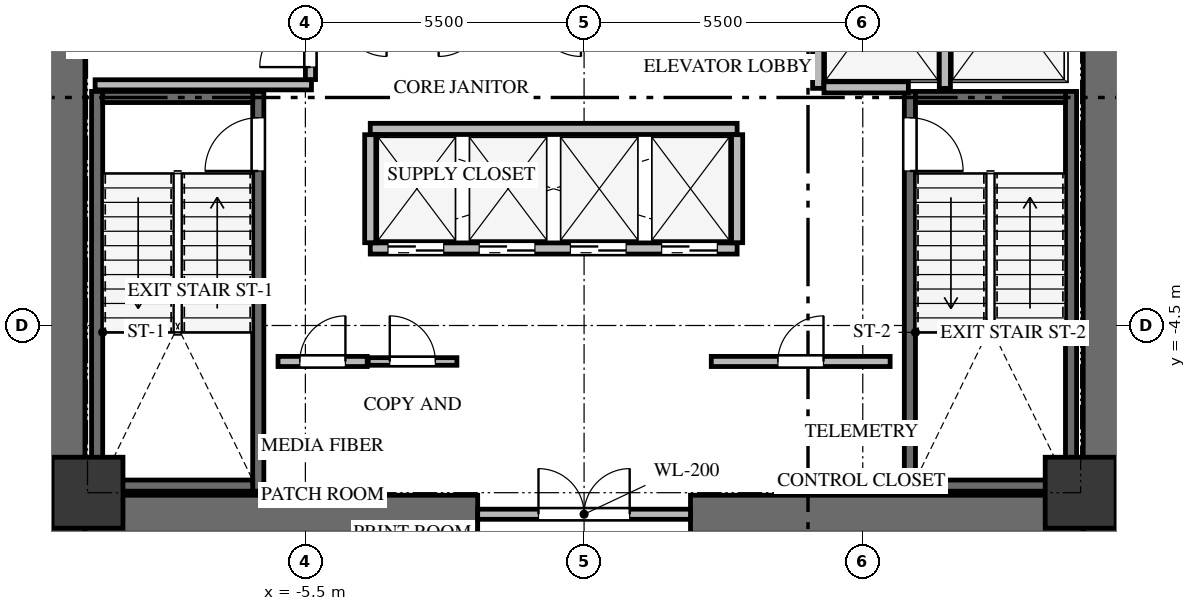
"""IFC4 building model, lengths in metres.
Left out: names, types, materials, properties, quantities, classifications, styles, units other than length and angle.
Written with IfcOpenShell. Run it as: python <this file> out.ifc"""

import sys

from ifc_helpers import new_model, si_unit, direction, frame, frame_2d, origin, origin_2d, place, context, subcontext, project, spatial, rectangle, extrude, source, transform, mapped, element, fill, save


model = new_model("IFC4")
c1 = context("Model", 3, precision=1e-05, world=origin(), true_north=direction((0.0, 1.0)))
c2 = subcontext(c1, "Body", "Model", "MODEL_VIEW")
j1 = project(units=[si_unit("LENGTHUNIT", "METRE"), si_unit("PLANEANGLEUNIT", "RADIAN")], contexts=[c1])
p1 = place(None, origin())
s1 = spatial("IfcSite", under=j1, at=p1, CompositionType="ELEMENT")
p2 = place(p1, origin())
s2 = spatial("IfcBuilding", under=s1, at=p2, CompositionType="ELEMENT")
p3 = place(p2, frame((0.0, 0.0, 93.3)))
s3 = spatial("IfcBuildingStorey", under=s2, at=p3, CompositionType="ELEMENT", Elevation=93.3)
for number, where, z_axis, x_axis in (
    (1, (-10.225, -8.6, 0.0), (0.0, 0.0, 1.0), (0.0, 1.0, 0.0)),
    (2, (10.225, -8.6, 0.0), (0.0, 0.0, 1.0), (0.0, 1.0, 0.0)),
):
    element("IfcWall", number, at=place(p3, frame(where, z_axis=z_axis, x_axis=x_axis)), inside=s3, PredefinedType="SHEAR", context=c2, shape_type="SweptSolid", body=[
        extrude(rectangle(XDim=17.2, YDim=0.75, at=frame_2d((8.6, 0.0))), origin(), (0.0, 0.0, 1.0), 4.2),
    ])
for number, where, z_axis, x_axis in (
    (3, (-9.85, -8.225, 0.0), (0.0, 0.0, 1.0), (1.0, 0.0, 0.0)),
    (4, (2.1, -8.225, 0.0), (0.0, 0.0, 1.0), (1.0, 0.0, 0.0)),
):
    element("IfcWall", number, at=place(p3, frame(where, z_axis=z_axis, x_axis=x_axis)), inside=s3, PredefinedType="SHEAR", context=c2, shape_type="SweptSolid", body=[
        extrude(rectangle(XDim=7.75, YDim=0.75, at=frame_2d((3.875, 0.0))), origin(), (0.0, 0.0, 1.0), 4.2),
    ])
p4 = place(p3, frame((-6.43, -7.77, -0.3), z_axis=(0.0, 0.0, 1.0), x_axis=(0.0, 1.0, 0.0)))
e5 = element("IfcWall", 5, at=p4, inside=s3, PredefinedType="SHEAR", context=c2, shape_type="SweptSolid", body=[
    extrude(rectangle(XDim=7.89, YDim=0.22, at=frame_2d((3.945, 0.0))), origin(), (0.0, 0.0, 1.0), 4.26),
])
p5 = place(p4, frame((6.32, 0.0, 0.0)))
e6 = element("IfcOpeningElement", 6, at=p5, cuts=e5, PredefinedType="OPENING", context=c2, shape_type="SweptSolid", body=[
    extrude(rectangle(XDim=1.05, YDim=2.15, at=frame_2d((0.525, 1.075))), frame((0.0, 0.12, 0.0), z_axis=(0.0, -1.0, 0.0), x_axis=(1.0, 0.0, 0.0)), (0.0, 0.0, 1.0), 0.24),
])
p6 = place(p3, frame((-9.61, 0.12, -0.3), z_axis=(0.0, 0.0, 1.0), x_axis=(0.0, -1.0, 0.0)))
e7 = element("IfcWall", 7, at=p6, inside=s3, PredefinedType="SHEAR", context=c2, shape_type="SweptSolid", body=[
    extrude(rectangle(XDim=7.89, YDim=0.22, at=frame_2d((3.945, 0.0))), origin(), (0.0, 0.0, 1.0), 4.26),
])
for number, where, z_axis, x_axis in (
    (8, (-9.5, -7.66, -0.3), (0.0, 0.0, 1.0), (1.0, 0.0, 0.0)),
    (9, (-6.54, 0.01, -0.3), (0.0, 0.0, 1.0), (-1.0, 0.0, 0.0)),
):
    element("IfcWall", number, at=place(p3, frame(where, z_axis=z_axis, x_axis=x_axis)), inside=s3, PredefinedType="SHEAR", context=c2, shape_type="SweptSolid", body=[
        extrude(rectangle(XDim=2.96, YDim=0.22, at=frame_2d((1.48, 0.0))), origin(), (0.0, 0.0, 1.0), 4.26),
    ])
p7 = place(p3, frame((9.61, -7.77, -0.3), z_axis=(0.0, 0.0, 1.0), x_axis=(0.0, 1.0, 0.0)))
e10 = element("IfcWall", 10, at=p7, inside=s3, PredefinedType="SHEAR", context=c2, shape_type="SweptSolid", body=[
    extrude(rectangle(XDim=7.89, YDim=0.22, at=frame_2d((3.945, 0.0))), origin(), (0.0, 0.0, 1.0), 4.26),
])
p8 = place(p3, frame((6.43, 0.12, -0.3), z_axis=(0.0, 0.0, 1.0), x_axis=(0.0, -1.0, 0.0)))
e11 = element("IfcWall", 11, at=p8, inside=s3, PredefinedType="SHEAR", context=c2, shape_type="SweptSolid", body=[
    extrude(rectangle(XDim=7.89, YDim=0.22, at=frame_2d((3.945, 0.0))), origin(), (0.0, 0.0, 1.0), 4.26),
])
p9 = place(p8, frame((0.52, 0.0, 0.0)))
e12 = element("IfcOpeningElement", 12, at=p9, cuts=e11, PredefinedType="OPENING", context=c2, shape_type="SweptSolid", body=[
    extrude(rectangle(XDim=1.05, YDim=2.15, at=frame_2d((0.525, 1.075))), frame((0.0, 0.12, 0.0), z_axis=(0.0, -1.0, 0.0), x_axis=(1.0, 0.0, 0.0)), (0.0, 0.0, 1.0), 0.24),
])
for number, where, z_axis, x_axis in (
    (13, (6.54, -7.66, -0.3), (0.0, 0.0, 1.0), (1.0, 0.0, 0.0)),
    (14, (9.5, 0.01, -0.3), (0.0, 0.0, 1.0), (-1.0, 0.0, 0.0)),
):
    element("IfcWall", number, at=place(p3, frame(where, z_axis=z_axis, x_axis=x_axis)), inside=s3, PredefinedType="SHEAR", context=c2, shape_type="SweptSolid", body=[
        extrude(rectangle(XDim=2.96, YDim=0.22, at=frame_2d((1.48, 0.0))), origin(), (0.0, 0.0, 1.0), 4.26),
    ])
m1 = source(origin(), c2, "Body", "SweptSolid", [
    extrude(rectangle(XDim=1.4, YDim=1.4, at=origin_2d()), origin(), (0.0, 0.0, 1.0), 4.26),
])
for number, where, z_axis, x_axis in (
    (15, (-9.8, -7.8, -0.3), (0.0, 0.0, 1.0), (1.0, 0.0, 0.0)),
    (16, (9.8, -7.8, -0.3), (0.0, 0.0, 1.0), (1.0, 0.0, 0.0)),
):
    element("IfcColumn", number, at=place(p3, frame(where, z_axis=z_axis, x_axis=x_axis)), inside=s3, PredefinedType="COLUMN", context=c2, shape_type="MappedRepresentation", body=[
        mapped(m1, transform((0.0, 0.0, 0.0), x_axis=(1.0, 0.0, 0.0), y_axis=(0.0, 1.0, 0.0), z_axis=(0.0, 0.0, 1.0), scale=1.0)),
    ])
p10 = place(p3, frame((-2.1, -8.225, 0.0), z_axis=(0.0, 0.0, 1.0), x_axis=(1.0, 0.0, 0.0)))
e17 = element("IfcWall", 17, at=p10, inside=s3, PredefinedType="SOLIDWALL", context=c2, shape_type="SweptSolid", body=[
    extrude(rectangle(XDim=4.2, YDim=0.2, at=frame_2d((2.1, 0.0))), origin(), (0.0, 0.0, 1.0), 3.945),
])
p11 = place(p10, frame((1.2, 0.0, 0.0)))
e18 = element("IfcOpeningElement", 18, at=p11, cuts=e17, PredefinedType="OPENING", context=c2, shape_type="SweptSolid", body=[
    extrude(rectangle(XDim=1.8, YDim=2.15, at=frame_2d((0.9, 1.075))), frame((0.0, 0.11, 0.0), z_axis=(0.0, -1.0, 0.0), x_axis=(1.0, 0.0, 0.0)), (0.0, 0.0, 1.0), 0.22),
])
p12 = place(p3, frame((-9.65, 0.25, 0.0), z_axis=(0.0, 0.0, 1.0), x_axis=(1.0, 0.0, 0.0)))
e19 = element("IfcWall", 19, at=p12, inside=s3, PredefinedType="SOLIDWALL", context=c2, shape_type="SweptSolid", body=[
    extrude(rectangle(XDim=4.27, YDim=0.2, at=frame_2d((2.135, 0.0))), origin(), (0.0, 0.0, 1.0), 3.945),
])
p13 = place(p3, frame((-5.4, 0.354, 0.0), z_axis=(0.0, 0.0, 1.0), x_axis=(0.0, 1.0, 0.0)))
e20 = element("IfcWall", 20, at=p13, inside=s3, PredefinedType="SOLIDWALL", context=c2, shape_type="SweptSolid", body=[
    extrude(rectangle(XDim=4.026, YDim=0.2, at=frame_2d((2.013, 0.0))), origin(), (0.0, 0.0, 1.0), 3.945),
])
p14 = place(p13, frame((0.246, 0.0, 0.0)))
e21 = element("IfcOpeningElement", 21, at=p14, cuts=e20, PredefinedType="OPENING", context=c2, shape_type="SweptSolid", body=[
    extrude(rectangle(XDim=1.0, YDim=2.15, at=frame_2d((0.5, 1.075))), frame((0.0, 0.11, 0.0), z_axis=(0.0, -1.0, 0.0), x_axis=(1.0, 0.0, 0.0)), (0.0, 0.0, 1.0), 0.22),
])
for number, where, z_axis, x_axis in (
    (22, (4.62, 0.18, 0.0), (0.0, 0.0, 1.0), (0.0, 1.0, 0.0)),
    (23, (7.12, 0.18, 0.0), (0.0, 0.0, 1.0), (0.0, 1.0, 0.0)),
):
    element("IfcWall", number, at=place(p3, frame(where, z_axis=z_axis, x_axis=x_axis)), inside=s3, PredefinedType="SOLIDWALL", context=c2, shape_type="SweptSolid", body=[
        extrude(rectangle(XDim=3.186, YDim=0.22, at=frame_2d((1.593, 0.0))), origin(), (0.0, 0.0, 1.0), 3.945),
    ])
p15 = place(p3, frame((4.734, 0.2, 0.0), z_axis=(0.0, 0.0, 1.0), x_axis=(1.0, 0.0, 0.0)))
e24 = element("IfcWall", 24, at=p15, inside=s3, PredefinedType="SOLIDWALL", context=c2, shape_type="SweptSolid", body=[
    extrude(rectangle(XDim=1.666, YDim=0.22, at=frame_2d((0.833, 0.0))), origin(), (0.0, 0.0, 1.0), 3.945),
])
p16 = place(p3, frame((-4.22, -2.98, 0.0), z_axis=(0.0, 0.0, 1.0), x_axis=(1.0, 0.0, 0.0)))
e25 = element("IfcWall", 25, at=p16, inside=s3, PredefinedType="SOLIDWALL", context=c2, shape_type="SweptSolid", body=[
    extrude(rectangle(XDim=7.24, YDim=0.22, at=frame_2d((3.62, 0.0))), origin(), (0.0, 0.0, 1.0), 3.945),
])
p17 = place(p16, frame((0.35, 0.0, 0.0)))
e26 = element("IfcOpeningElement", 26, at=p17, cuts=e25, PredefinedType="OPENING", context=c2, shape_type="SweptSolid", body=[
    extrude(rectangle(XDim=1.1, YDim=2.15, at=frame_2d((0.55, 1.075))), frame((0.0, 0.12, 0.0), z_axis=(0.0, -1.0, 0.0), x_axis=(1.0, 0.0, 0.0)), (0.0, 0.0, 1.0), 0.24),
])
p18 = place(p16, frame((2.15, 0.0, 0.0)))
e27 = element("IfcOpeningElement", 27, at=p18, cuts=e25, PredefinedType="OPENING", context=c2, shape_type="SweptSolid", body=[
    extrude(rectangle(XDim=1.1, YDim=2.15, at=frame_2d((0.55, 1.075))), frame((0.0, 0.12, 0.0), z_axis=(0.0, -1.0, 0.0), x_axis=(1.0, 0.0, 0.0)), (0.0, 0.0, 1.0), 0.24),
])
p19 = place(p16, frame((3.95, 0.0, 0.0)))
e28 = element("IfcOpeningElement", 28, at=p19, cuts=e25, PredefinedType="OPENING", context=c2, shape_type="SweptSolid", body=[
    extrude(rectangle(XDim=1.1, YDim=2.15, at=frame_2d((0.55, 1.075))), frame((0.0, 0.12, 0.0), z_axis=(0.0, -1.0, 0.0), x_axis=(1.0, 0.0, 0.0)), (0.0, 0.0, 1.0), 0.24),
])
p20 = place(p16, frame((5.75, 0.0, 0.0)))
e29 = element("IfcOpeningElement", 29, at=p20, cuts=e25, PredefinedType="OPENING", context=c2, shape_type="SweptSolid", body=[
    extrude(rectangle(XDim=1.1, YDim=2.15, at=frame_2d((0.55, 1.075))), frame((0.0, 0.12, 0.0), z_axis=(0.0, -1.0, 0.0), x_axis=(1.0, 0.0, 0.0)), (0.0, 0.0, 1.0), 0.24),
])
p21 = place(p3, frame((-4.22, -0.62, 0.0), z_axis=(0.0, 0.0, 1.0), x_axis=(1.0, 0.0, 0.0)))
e30 = element("IfcWall", 30, at=p21, inside=s3, PredefinedType="SOLIDWALL", context=c2, shape_type="SweptSolid", body=[
    extrude(rectangle(XDim=7.24, YDim=0.22, at=frame_2d((3.62, 0.0))), origin(), (0.0, 0.0, 1.0), 3.945),
])
for number, where, z_axis, x_axis in (
    (31, (-4.22, -2.866, 0.0), (0.0, 0.0, 1.0), (0.0, 1.0, 0.0)),
    (32, (3.02, -2.866, 0.0), (0.0, 0.0, 1.0), (0.0, 1.0, 0.0)),
):
    element("IfcWall", number, at=place(p3, frame(where, z_axis=z_axis, x_axis=x_axis)), inside=s3, PredefinedType="SOLIDWALL", context=c2, shape_type="SweptSolid", body=[
        extrude(rectangle(XDim=2.132, YDim=0.22, at=frame_2d((1.066, 0.0))), origin(), (0.0, 0.0, 1.0), 3.945),
    ])
p22 = place(p3, frame((-6.04, -5.21, 0.0), z_axis=(0.0, 0.0, 1.0), x_axis=(1.0, 0.0, 0.0)))
e33 = element("IfcWall", 33, at=p22, inside=s3, PredefinedType="SOLIDWALL", context=c2, shape_type="SweptSolid", body=[
    extrude(rectangle(XDim=1.76, YDim=0.2, at=frame_2d((0.88, 0.0))), origin(), (0.0, 0.0, 1.0), 3.945),
])
p23 = place(p22, frame((0.43, 0.0, 0.0)))
e34 = element("IfcOpeningElement", 34, at=p23, cuts=e33, PredefinedType="OPENING", context=c2, shape_type="SweptSolid", body=[
    extrude(rectangle(XDim=0.9, YDim=2.05, at=frame_2d((0.45, 1.025))), frame((0.0, 0.11, 0.0), z_axis=(0.0, -1.0, 0.0), x_axis=(1.0, 0.0, 0.0)), (0.0, 0.0, 1.0), 0.22),
])
p24 = place(p3, frame((-4.26, -5.21, 0.0), z_axis=(0.0, 0.0, 1.0), x_axis=(1.0, 0.0, 0.0)))
e35 = element("IfcWall", 35, at=p24, inside=s3, PredefinedType="PARTITIONING", context=c2, shape_type="SweptSolid", body=[
    extrude(rectangle(XDim=1.75, YDim=0.15, at=frame_2d((0.875, 0.0))), origin(), (0.0, 0.0, 1.0), 3.945),
])
p25 = place(p24, frame((0.425, 0.0, 0.0)))
e36 = element("IfcOpeningElement", 36, at=p25, cuts=e35, PredefinedType="OPENING", context=c2, shape_type="SweptSolid", body=[
    extrude(rectangle(XDim=0.9, YDim=2.05, at=frame_2d((0.45, 1.025))), frame((0.0, 0.085, 0.0), z_axis=(0.0, -1.0, 0.0), x_axis=(1.0, 0.0, 0.0)), (0.0, 0.0, 1.0), 0.17),
])
p26 = place(p3, frame((2.51, -5.21, 0.0), z_axis=(0.0, 0.0, 1.0), x_axis=(1.0, 0.0, 0.0)))
e37 = element("IfcWall", 37, at=p26, inside=s3, PredefinedType="SOLIDWALL", context=c2, shape_type="SweptSolid", body=[
    extrude(rectangle(XDim=3.53, YDim=0.2, at=frame_2d((1.765, 0.0))), origin(), (0.0, 0.0, 1.0), 3.945),
])
p27 = place(p26, frame((1.315, 0.0, 0.0)))
e38 = element("IfcOpeningElement", 38, at=p27, cuts=e37, PredefinedType="OPENING", context=c2, shape_type="SweptSolid", body=[
    extrude(rectangle(XDim=0.9, YDim=2.05, at=frame_2d((0.45, 1.025))), frame((0.0, 0.11, 0.0), z_axis=(0.0, -1.0, 0.0), x_axis=(1.0, 0.0, 0.0)), (0.0, 0.0, 1.0), 0.22),
])
m2 = source(origin(), c2, "Body", "SweptSolid", [
    extrude(rectangle(XDim=1.05, YDim=2.15, at=frame_2d((0.525, 1.075))), frame((0.0, 0.025, 0.0), z_axis=(0.0, -1.0, 0.0), x_axis=(1.0, 0.0, 0.0)), (0.0, 0.0, 1.0), 0.05),
])
p28 = place(p5, origin())
e39 = element("IfcDoor", 39, at=p28, inside=s3, OperationType="SINGLE_SWING_LEFT", PredefinedType="DOOR", context=c2, shape_type="MappedRepresentation", body=[
    mapped(m2, transform((0.0, 0.0, 0.0), x_axis=(1.0, 0.0, 0.0), y_axis=(0.0, 1.0, 0.0), z_axis=(0.0, 0.0, 1.0), scale=1.0)),
])
fill(e6, e39)
m3 = source(origin(), c2, "Body", "SweptSolid", [
    extrude(rectangle(XDim=1.05, YDim=2.15, at=frame_2d((0.525, 1.075))), frame((0.0, 0.025, 0.0), z_axis=(0.0, -1.0, 0.0), x_axis=(1.0, 0.0, 0.0)), (0.0, 0.0, 1.0), 0.05),
])
p29 = place(p9, origin())
e40 = element("IfcDoor", 40, at=p29, inside=s3, OperationType="SINGLE_SWING_RIGHT", PredefinedType="DOOR", context=c2, shape_type="MappedRepresentation", body=[
    mapped(m3, transform((0.0, 0.0, 0.0), x_axis=(1.0, 0.0, 0.0), y_axis=(0.0, 1.0, 0.0), z_axis=(0.0, 0.0, 1.0), scale=1.0)),
])
fill(e12, e40)
m4 = source(origin(), c2, "Body", "SweptSolid", [
    extrude(rectangle(XDim=1.8, YDim=2.15, at=frame_2d((0.9, 1.075))), frame((0.0, 0.025, 0.0), z_axis=(0.0, -1.0, 0.0), x_axis=(1.0, 0.0, 0.0)), (0.0, 0.0, 1.0), 0.05),
])
p30 = place(p11, origin())
e41 = element("IfcDoor", 41, at=p30, inside=s3, OperationType="DOUBLE_DOOR_SINGLE_SWING", PredefinedType="DOOR", context=c2, shape_type="MappedRepresentation", body=[
    mapped(m4, transform((0.0, 0.0, 0.0), x_axis=(1.0, 0.0, 0.0), y_axis=(0.0, 1.0, 0.0), z_axis=(0.0, 0.0, 1.0), scale=1.0)),
])
fill(e18, e41)
m5 = source(origin(), c2, "Body", "SweptSolid", [
    extrude(rectangle(XDim=1.0, YDim=2.15, at=frame_2d((0.5, 1.075))), frame((0.0, 0.025, 0.0), z_axis=(0.0, -1.0, 0.0), x_axis=(1.0, 0.0, 0.0)), (0.0, 0.0, 1.0), 0.05),
])
p31 = place(p14, origin())
e42 = element("IfcDoor", 42, at=p31, inside=s3, OperationType="SINGLE_SWING_LEFT", PredefinedType="DOOR", context=c2, shape_type="MappedRepresentation", body=[
    mapped(m5, transform((0.0, 0.0, 0.0), x_axis=(1.0, 0.0, 0.0), y_axis=(0.0, 1.0, 0.0), z_axis=(0.0, 0.0, 1.0), scale=1.0)),
])
fill(e21, e42)
m6 = source(origin(), c2, "Body", "SweptSolid", [
    extrude(rectangle(XDim=1.1, YDim=2.15, at=frame_2d((0.55, 1.075))), frame((0.0, 0.025, 0.0), z_axis=(0.0, -1.0, 0.0), x_axis=(1.0, 0.0, 0.0)), (0.0, 0.0, 1.0), 0.05),
])
p32 = place(p17, origin())
e43 = element("IfcDoor", 43, at=p32, inside=s3, OperationType="DOUBLE_DOOR_SLIDING", PredefinedType="DOOR", context=c2, shape_type="MappedRepresentation", body=[
    mapped(m6, transform((0.0, 0.0, 0.0), x_axis=(1.0, 0.0, 0.0), y_axis=(0.0, 1.0, 0.0), z_axis=(0.0, 0.0, 1.0), scale=1.0)),
])
fill(e26, e43)
p33 = place(p18, origin())
e44 = element("IfcDoor", 44, at=p33, inside=s3, OperationType="DOUBLE_DOOR_SLIDING", PredefinedType="DOOR", context=c2, shape_type="MappedRepresentation", body=[
    mapped(m6, transform((0.0, 0.0, 0.0), x_axis=(1.0, 0.0, 0.0), y_axis=(0.0, 1.0, 0.0), z_axis=(0.0, 0.0, 1.0), scale=1.0)),
])
fill(e27, e44)
p34 = place(p19, origin())
e45 = element("IfcDoor", 45, at=p34, inside=s3, OperationType="DOUBLE_DOOR_SLIDING", PredefinedType="DOOR", context=c2, shape_type="MappedRepresentation", body=[
    mapped(m6, transform((0.0, 0.0, 0.0), x_axis=(1.0, 0.0, 0.0), y_axis=(0.0, 1.0, 0.0), z_axis=(0.0, 0.0, 1.0), scale=1.0)),
])
fill(e28, e45)
p35 = place(p20, origin())
e46 = element("IfcDoor", 46, at=p35, inside=s3, OperationType="DOUBLE_DOOR_SLIDING", PredefinedType="DOOR", context=c2, shape_type="MappedRepresentation", body=[
    mapped(m6, transform((0.0, 0.0, 0.0), x_axis=(1.0, 0.0, 0.0), y_axis=(0.0, 1.0, 0.0), z_axis=(0.0, 0.0, 1.0), scale=1.0)),
])
fill(e29, e46)
m7 = source(origin(), c2, "Body", "SweptSolid", [
    extrude(rectangle(XDim=0.9, YDim=2.05, at=frame_2d((0.45, 1.025))), frame((0.0, 0.025, 0.0), z_axis=(0.0, -1.0, 0.0), x_axis=(1.0, 0.0, 0.0)), (0.0, 0.0, 1.0), 0.05),
])
p36 = place(p23, origin())
e47 = element("IfcDoor", 47, at=p36, inside=s3, OperationType="SINGLE_SWING_RIGHT", PredefinedType="DOOR", context=c2, shape_type="MappedRepresentation", body=[
    mapped(m7, transform((0.0, 0.0, 0.0), x_axis=(1.0, 0.0, 0.0), y_axis=(0.0, 1.0, 0.0), z_axis=(0.0, 0.0, 1.0), scale=1.0)),
])
fill(e34, e47)
m8 = source(origin(), c2, "Body", "SweptSolid", [
    extrude(rectangle(XDim=0.9, YDim=2.05, at=frame_2d((0.45, 1.025))), frame((0.0, 0.025, 0.0), z_axis=(0.0, -1.0, 0.0), x_axis=(1.0, 0.0, 0.0)), (0.0, 0.0, 1.0), 0.05),
])
p37 = place(p25, origin())
e48 = element("IfcDoor", 48, at=p37, inside=s3, OperationType="SINGLE_SWING_LEFT", PredefinedType="DOOR", context=c2, shape_type="MappedRepresentation", body=[
    mapped(m8, transform((0.0, 0.0, 0.0), x_axis=(1.0, 0.0, 0.0), y_axis=(0.0, 1.0, 0.0), z_axis=(0.0, 0.0, 1.0), scale=1.0)),
])
fill(e36, e48)
p38 = place(p27, origin())
e49 = element("IfcDoor", 49, at=p38, inside=s3, OperationType="SINGLE_SWING_RIGHT", PredefinedType="DOOR", context=c2, shape_type="MappedRepresentation", body=[
    mapped(m7, transform((0.0, 0.0, 0.0), x_axis=(1.0, 0.0, 0.0), y_axis=(0.0, 1.0, 0.0), z_axis=(0.0, 0.0, 1.0), scale=1.0)),
])
fill(e38, e49)
save(model, sys.argv[1])
